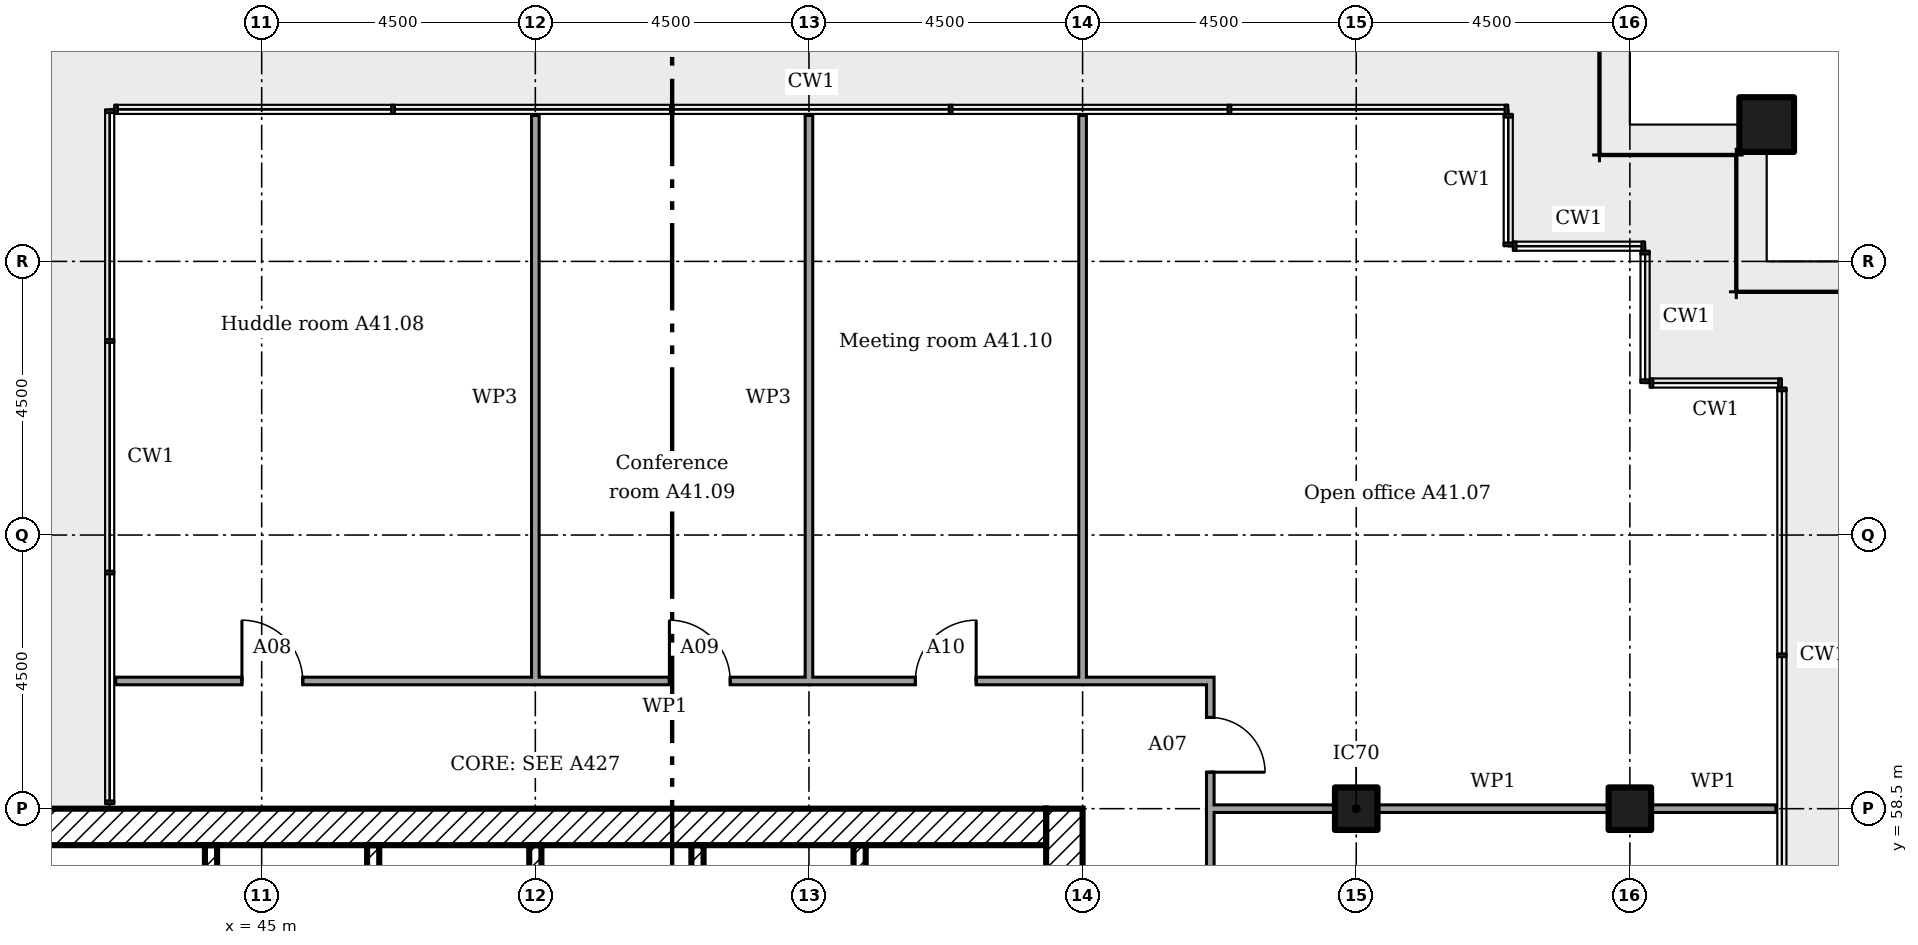
"""IFC4 building model, lengths in metres.
Left out: names, types, materials, properties, quantities, classifications, styles, units other than length and angle.
Written with IfcOpenShell. Run it as: python <this file> out.ifc"""

import sys

from ifc_helpers import new_model, si_unit, direction, frame, frame_2d, origin, origin_2d, place, context, subcontext, project, spatial, rectangle, extrude, element, fill, save


model = new_model("IFC4")
c1 = context("Model", 3, precision=1e-05, world=origin(), true_north=direction((0.0, 1.0)))
c2 = subcontext(c1, "Body", "Model", "MODEL_VIEW")
j1 = project(units=[si_unit("LENGTHUNIT", "METRE"), si_unit("PLANEANGLEUNIT", "RADIAN")], contexts=[c1])
p1 = place(None, origin())
s1 = spatial("IfcSite", under=j1, at=p1, CompositionType="ELEMENT")
p2 = place(p1, origin())
s2 = spatial("IfcBuilding", under=s1, at=p2, CompositionType="ELEMENT")
p3 = place(p2, frame((0.0, 0.0, 165.4)))
s3 = spatial("IfcBuildingStorey", under=s2, at=p3, CompositionType="ELEMENT", Elevation=165.4)
p4 = place(p3, frame((69.75, 69.75, 0.0)))
e1 = element("IfcColumn", 1, at=p4, inside=s3, PredefinedType="COLUMN", context=c2, shape_type="SweptSolid", body=[
    extrude(rectangle(XDim=0.9, YDim=0.9, at=origin_2d()), origin(), (0.0, 0.0, 1.0), 3.6),
])
for number, where in (
    (2, (63.0, 58.5, 0.0)),
    (3, (67.5, 58.5, 0.0)),
):
    element("IfcColumn", number, at=place(p3, frame(where)), inside=s3, PredefinedType="COLUMN", context=c2, shape_type="SweptSolid", body=[
        extrude(rectangle(XDim=0.7, YDim=0.7, at=origin_2d()), origin(), (0.0, 0.0, 1.0), 3.6),
    ])
p5 = place(p3, frame((58.2, 40.5, 0.0), z_axis=(0.0, 0.0, 1.0), x_axis=(0.0, 1.0, 0.0)))
e4 = element("IfcWall", 4, at=p5, inside=s3, PredefinedType="SHEAR", context=c2, shape_type="SweptSolid", body=[
    extrude(rectangle(XDim=18.0, YDim=0.6, at=frame_2d((9.0, 0.0))), origin(), (0.0, 0.0, 1.0), 3.35),
])
p6 = place(p5, frame((13.15, 0.0, 0.0)))
e5 = element("IfcOpeningElement", 5, at=p6, cuts=e4, PredefinedType="OPENING", context=c2, shape_type="SweptSolid", body=[
    extrude(rectangle(XDim=1.2, YDim=2.1, at=frame_2d((0.6, 1.05))), frame((0.0, 0.31, 0.0), z_axis=(0.0, -1.0, 0.0), x_axis=(1.0, 0.0, 0.0)), (0.0, 0.0, 1.0), 0.62),
])
p7 = place(p5, frame((3.9, 0.0, 0.0)))
e6 = element("IfcOpeningElement", 6, at=p7, cuts=e4, PredefinedType="OPENING", context=c2, shape_type="SweptSolid", body=[
    extrude(rectangle(XDim=1.8, YDim=2.1, at=frame_2d((0.9, 1.05))), frame((0.0, 0.31, 0.0), z_axis=(0.0, -1.0, 0.0), x_axis=(1.0, 0.0, 0.0)), (0.0, 0.0, 1.0), 0.62),
])
p8 = place(p5, frame((11.525, 0.0, 0.0)))
e7 = element("IfcOpeningElement", 7, at=p8, cuts=e4, PredefinedType="OPENING", context=c2, shape_type="SweptSolid", body=[
    extrude(rectangle(XDim=1.0, YDim=2.1, at=frame_2d((0.5, 1.05))), frame((0.0, 0.31, 0.0), z_axis=(0.0, -1.0, 0.0), x_axis=(1.0, 0.0, 0.0)), (0.0, 0.0, 1.0), 0.62),
])
p9 = place(p3, frame((40.5, 58.2, 0.0)))
e8 = element("IfcWall", 8, at=p9, inside=s3, PredefinedType="SHEAR", context=c2, shape_type="SweptSolid", body=[
    extrude(rectangle(XDim=17.4, YDim=0.6, at=frame_2d((8.7, 0.0))), origin(), (0.0, 0.0, 1.0), 3.35),
])
p10 = place(p3, frame((44.167, 57.9, 0.0), z_axis=(0.0, 0.0, 1.0), x_axis=(0.0, -1.0, 0.0)))
e9 = element("IfcWall", 9, at=p10, inside=s3, PredefinedType="SHEAR", context=c2, shape_type="SweptSolid", body=[
    extrude(rectangle(XDim=3.5, YDim=0.2, at=frame_2d((1.75, 0.0))), origin(), (0.0, 0.0, 1.0), 3.35),
])
p11 = place(p3, frame((46.833, 57.9, 0.0), z_axis=(0.0, 0.0, 1.0), x_axis=(0.0, -1.0, 0.0)))
e10 = element("IfcWall", 10, at=p11, inside=s3, PredefinedType="SHEAR", context=c2, shape_type="SweptSolid", body=[
    extrude(rectangle(XDim=4.6, YDim=0.2, at=frame_2d((2.3, 0.0))), origin(), (0.0, 0.0, 1.0), 3.35),
])
for number, where, z_axis, x_axis in (
    (11, (49.5, 57.9, 0.0), (0.0, 0.0, 1.0), (0.0, -1.0, 0.0)),
    (12, (52.167, 57.9, 0.0), (0.0, 0.0, 1.0), (0.0, -1.0, 0.0)),
    (13, (54.833, 57.9, 0.0), (0.0, 0.0, 1.0), (0.0, -1.0, 0.0)),
):
    element("IfcWall", number, at=place(p3, frame(where, z_axis=z_axis, x_axis=x_axis)), inside=s3, PredefinedType="SHEAR", context=c2, shape_type="SweptSolid", body=[
        extrude(rectangle(XDim=2.7, YDim=0.2, at=frame_2d((1.35, 0.0))), origin(), (0.0, 0.0, 1.0), 3.35),
    ])
p12 = place(p3, frame((60.6, 58.5, 0.0)))
e14 = element("IfcWall", 14, at=p12, inside=s3, PredefinedType="PARTITIONING", context=c2, shape_type="SweptSolid", body=[
    extrude(rectangle(XDim=2.05, YDim=0.125, at=frame_2d((1.025, 0.0))), origin(), (0.0, 0.0, 1.0), 2.676),
])
p13 = place(p3, frame((63.35, 58.5, 0.0)))
e15 = element("IfcWall", 15, at=p13, inside=s3, PredefinedType="PARTITIONING", context=c2, shape_type="SweptSolid", body=[
    extrude(rectangle(XDim=3.8, YDim=0.125, at=frame_2d((1.9, 0.0))), origin(), (0.0, 0.0, 1.0), 2.676),
])
p14 = place(p3, frame((67.85, 58.5, 0.0)))
e16 = element("IfcWall", 16, at=p14, inside=s3, PredefinedType="PARTITIONING", context=c2, shape_type="SweptSolid", body=[
    extrude(rectangle(XDim=2.05, YDim=0.125, at=frame_2d((1.025, 0.0))), origin(), (0.0, 0.0, 1.0), 2.676),
])
p15 = place(p3, frame((42.6, 60.6, 0.0)))
e17 = element("IfcWall", 17, at=p15, inside=s3, PredefinedType="PARTITIONING", context=c2, shape_type="SweptSolid", body=[
    extrude(rectangle(XDim=18.062, YDim=0.125, at=frame_2d((9.031, 0.0))), origin(), (0.0, 0.0, 1.0), 3.45),
])
p16 = place(p15, frame((2.075, 0.0, 0.0)))
e18 = element("IfcOpeningElement", 18, at=p16, cuts=e17, PredefinedType="OPENING", context=c2, shape_type="SweptSolid", body=[
    extrude(rectangle(XDim=1.0, YDim=2.1, at=frame_2d((0.5, 1.05))), frame((0.0, 0.073, 0.0), z_axis=(0.0, -1.0, 0.0), x_axis=(1.0, 0.0, 0.0)), (0.0, 0.0, 1.0), 0.145),
])
p17 = place(p15, frame((9.105, 0.0, 0.0)))
e19 = element("IfcOpeningElement", 19, at=p17, cuts=e17, PredefinedType="OPENING", context=c2, shape_type="SweptSolid", body=[
    extrude(rectangle(XDim=1.0, YDim=2.1, at=frame_2d((0.5, 1.05))), frame((0.0, 0.073, 0.0), z_axis=(0.0, -1.0, 0.0), x_axis=(1.0, 0.0, 0.0)), (0.0, 0.0, 1.0), 0.145),
])
p18 = place(p15, frame((13.15, 0.0, 0.0)))
e20 = element("IfcOpeningElement", 20, at=p18, cuts=e17, PredefinedType="OPENING", context=c2, shape_type="SweptSolid", body=[
    extrude(rectangle(XDim=1.0, YDim=2.1, at=frame_2d((0.5, 1.05))), frame((0.0, 0.073, 0.0), z_axis=(0.0, -1.0, 0.0), x_axis=(1.0, 0.0, 0.0)), (0.0, 0.0, 1.0), 0.145),
])
for number, where, z_axis, x_axis in (
    (21, (49.5, 60.6, 0.0), (0.0, 0.0, 1.0), (0.0, 1.0, 0.0)),
    (22, (54.0, 60.6, 0.0), (0.0, 0.0, 1.0), (0.0, 1.0, 0.0)),
):
    element("IfcWall", number, at=place(p3, frame(where, z_axis=z_axis, x_axis=x_axis)), inside=s3, PredefinedType="MOVABLE", context=c2, shape_type="SweptSolid", body=[
        extrude(rectangle(XDim=9.3, YDim=0.125, at=frame_2d((4.65, 0.0))), origin(), (0.0, 0.0, 1.0), 2.766),
    ])
p19 = place(p3, frame((58.5, 60.6, 0.0), z_axis=(0.0, 0.0, 1.0), x_axis=(0.0, 1.0, 0.0)))
e23 = element("IfcWall", 23, at=p19, inside=s3, PredefinedType="PARTITIONING", context=c2, shape_type="SweptSolid", body=[
    extrude(rectangle(XDim=9.3, YDim=0.125, at=frame_2d((4.65, 0.0))), origin(), (0.0, 0.0, 1.0), 2.766),
])
p20 = place(p3, frame((60.6, 50.762, 0.0), z_axis=(0.0, 0.0, 1.0), x_axis=(0.0, 1.0, 0.0)))
e24 = element("IfcWall", 24, at=p20, inside=s3, PredefinedType="PARTITIONING", context=c2, shape_type="SweptSolid", body=[
    extrude(rectangle(XDim=9.775, YDim=0.125, at=frame_2d((4.888, 0.0))), origin(), (0.0, 0.0, 1.0), 3.45),
])
p21 = place(p20, frame((8.337, 0.0, 0.0)))
e25 = element("IfcOpeningElement", 25, at=p21, cuts=e24, PredefinedType="OPENING", context=c2, shape_type="SweptSolid", body=[
    extrude(rectangle(XDim=0.9, YDim=2.1, at=frame_2d((0.45, 1.05))), frame((0.0, 0.073, 0.0), z_axis=(0.0, -1.0, 0.0), x_axis=(1.0, 0.0, 0.0)), (0.0, 0.0, 1.0), 0.145),
])
p22 = place(p21, frame((0.9, 0.0, 0.0), x_axis=(-1.0, 0.0, 0.0)))
e26 = element("IfcDoor", 26, at=p22, inside=s3, OperationType="SINGLE_SWING_LEFT", PredefinedType="DOOR", context=c2, shape_type="SweptSolid", body=[
    extrude(rectangle(XDim=0.9, YDim=2.1, at=frame_2d((0.45, 1.05))), frame((0.0, 0.025, 0.0), z_axis=(0.0, -1.0, 0.0), x_axis=(1.0, 0.0, 0.0)), (0.0, 0.0, 1.0), 0.05),
])
fill(e25, e26)
p23 = place(p16, origin())
e27 = element("IfcDoor", 27, at=p23, inside=s3, OperationType="SINGLE_SWING_RIGHT", PredefinedType="DOOR", context=c2, shape_type="SweptSolid", body=[
    extrude(rectangle(XDim=1.0, YDim=2.1, at=frame_2d((0.5, 1.05))), frame((0.0, 0.025, 0.0), z_axis=(0.0, -1.0, 0.0), x_axis=(1.0, 0.0, 0.0)), (0.0, 0.0, 1.0), 0.05),
])
fill(e18, e27)
p24 = place(p17, origin())
e28 = element("IfcDoor", 28, at=p24, inside=s3, OperationType="SINGLE_SWING_RIGHT", PredefinedType="DOOR", context=c2, shape_type="SweptSolid", body=[
    extrude(rectangle(XDim=1.0, YDim=2.1, at=frame_2d((0.5, 1.05))), frame((0.0, 0.025, 0.0), z_axis=(0.0, -1.0, 0.0), x_axis=(1.0, 0.0, 0.0)), (0.0, 0.0, 1.0), 0.05),
])
fill(e19, e28)
p25 = place(p18, origin())
e29 = element("IfcDoor", 29, at=p25, inside=s3, OperationType="SINGLE_SWING_LEFT", PredefinedType="DOOR", context=c2, shape_type="SweptSolid", body=[
    extrude(rectangle(XDim=1.0, YDim=2.1, at=frame_2d((0.5, 1.05))), frame((0.0, 0.025, 0.0), z_axis=(0.0, -1.0, 0.0), x_axis=(1.0, 0.0, 0.0)), (0.0, 0.0, 1.0), 0.05),
])
fill(e20, e29)
save(model, sys.argv[1])
